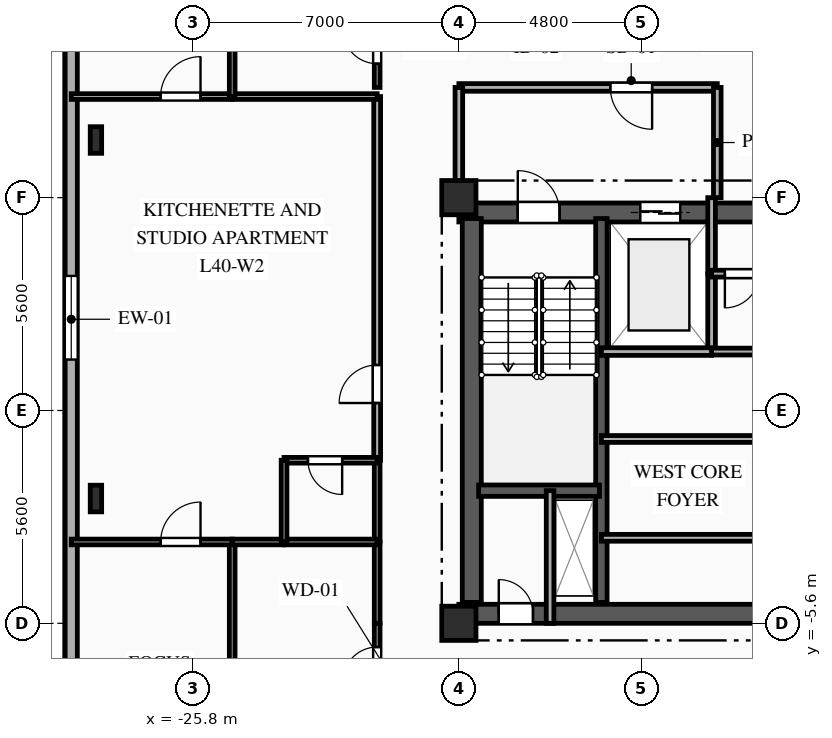
"""IFC4 building model, lengths in metres.
Left out: names, types, materials, properties, quantities, classifications, styles, units other than length and angle.
Written with IfcOpenShell. Run it as: python <this file> out.ifc"""

import sys

from ifc_helpers import new_model, si_unit, direction, frame, frame_2d, origin, origin_2d, place, context, subcontext, project, spatial, rectangle, i_section, extrude, element, fill, save


model = new_model("IFC4")
c1 = context("Model", 3, precision=1e-05, world=origin(), true_north=direction((0.0, 1.0)))
c2 = subcontext(c1, "Body", "Model", "MODEL_VIEW")
j1 = project(units=[si_unit("LENGTHUNIT", "METRE"), si_unit("PLANEANGLEUNIT", "RADIAN")], contexts=[c1])
p1 = place(None, origin())
s1 = spatial("IfcSite", under=j1, at=p1, CompositionType="ELEMENT")
p2 = place(p1, origin())
s2 = spatial("IfcBuilding", under=s1, at=p2, CompositionType="ELEMENT")
p3 = place(p2, frame((0.0, 0.0, 144.4)))
s3 = spatial("IfcBuildingStorey", under=s2, at=p3, CompositionType="ELEMENT", Elevation=144.4)
for number, where, z_axis, x_axis in (
    (1, (-18.8, -5.6, 0.0), (0.0, 0.0, 1.0), (1.0, 0.0, 0.0)),
    (2, (-18.8, 5.6, 0.0), (0.0, 0.0, 1.0), (1.0, 0.0, 0.0)),
):
    element("IfcColumn", number, at=place(p3, frame(where, z_axis=z_axis, x_axis=x_axis)), inside=s3, PredefinedType="COLUMN", context=c2, shape_type="SweptSolid", body=[
        extrude(rectangle(XDim=0.9, YDim=0.9, at=origin_2d()), origin(), (0.0, 0.0, 1.0), 3.35),
    ])
for number, where, z_axis, x_axis in (
    (3, (-28.35, 7.117, 0.0), (0.0, 0.0, 1.0), (1.0, 0.0, 0.0)),
    (4, (-28.35, -2.317, 0.0), (0.0, 0.0, 1.0), (1.0, 0.0, 0.0)),
):
    element("IfcColumn", number, at=place(p3, frame(where, z_axis=z_axis, x_axis=x_axis)), inside=s3, PredefinedType="COLUMN", context=c2, shape_type="SweptSolid", body=[
        extrude(i_section(OverallWidth=0.3, OverallDepth=0.7, WebThickness=0.017, FlangeThickness=0.032, FilletRadius=0.027, at=origin_2d()), origin(), (0.0, 0.0, 1.0), 3.35),
    ])
p4 = place(p3, frame((-29.0, -12.4, 0.0), z_axis=(0.0, 0.0, 1.0), x_axis=(0.0, 1.0, 0.0)))
e5 = element("IfcWall", 5, at=p4, inside=s3, PredefinedType="SOLIDWALL", context=c2, shape_type="SweptSolid", body=[
    extrude(rectangle(XDim=29.6, YDim=0.32, at=frame_2d((14.8, 0.0))), origin(), (0.0, 0.0, 1.0), 3.04),
])
p5 = place(p4, frame((3.895, 0.0, 0.85)))
e6 = element("IfcOpeningElement", 6, at=p5, cuts=e5, PredefinedType="OPENING", context=c2, shape_type="SweptSolid", body=[
    extrude(rectangle(XDim=1.65, YDim=1.85, at=frame_2d((0.825, 0.925))), frame((0.0, 0.17, 0.0), z_axis=(0.0, -1.0, 0.0), x_axis=(1.0, 0.0, 0.0)), (0.0, 0.0, 1.0), 0.34),
])
p6 = place(p4, frame((13.74, 0.0, 0.85)))
e7 = element("IfcOpeningElement", 7, at=p6, cuts=e5, PredefinedType="OPENING", context=c2, shape_type="SweptSolid", body=[
    extrude(rectangle(XDim=2.2, YDim=1.85, at=frame_2d((1.1, 0.925))), frame((0.0, 0.17, 0.0), z_axis=(0.0, -1.0, 0.0), x_axis=(1.0, 0.0, 0.0)), (0.0, 0.0, 1.0), 0.34),
])
p7 = place(p4, frame((24.135, 0.0, 0.85)))
e8 = element("IfcOpeningElement", 8, at=p7, cuts=e5, PredefinedType="OPENING", context=c2, shape_type="SweptSolid", body=[
    extrude(rectangle(XDim=1.65, YDim=1.85, at=frame_2d((0.825, 0.925))), frame((0.0, 0.17, 0.0), z_axis=(0.0, -1.0, 0.0), x_axis=(1.0, 0.0, 0.0)), (0.0, 0.0, 1.0), 0.34),
])
p8 = place(p3, frame((-18.8, 5.21, 0.0), z_axis=(0.0, 0.0, 1.0), x_axis=(1.0, 0.0, 0.0)))
e9 = element("IfcWall", 9, at=p8, inside=s3, PredefinedType="SHEAR", context=c2, shape_type="SweptSolid", body=[
    extrude(rectangle(XDim=9.6, YDim=0.5, at=frame_2d((4.8, 0.0))), origin(), (0.0, 0.0, 1.0), 3.04),
])
p9 = place(p8, frame((1.55, 0.0, 0.0)))
e10 = element("IfcOpeningElement", 10, at=p9, cuts=e9, PredefinedType="OPENING", context=c2, shape_type="SweptSolid", body=[
    extrude(rectangle(XDim=1.1, YDim=2.15, at=frame_2d((0.55, 1.075))), frame((0.0, 0.26, 0.0), z_axis=(0.0, -1.0, 0.0), x_axis=(1.0, 0.0, 0.0)), (0.0, 0.0, 1.0), 0.52),
])
p10 = place(p8, frame((4.775, 0.0, 0.0)))
e11 = element("IfcOpeningElement", 11, at=p10, cuts=e9, PredefinedType="OPENING", context=c2, shape_type="SweptSolid", body=[
    extrude(rectangle(XDim=1.05, YDim=2.1, at=frame_2d((0.525, 1.05))), frame((0.0, 0.26, 0.0), z_axis=(0.0, -1.0, 0.0), x_axis=(1.0, 0.0, 0.0)), (0.0, 0.0, 1.0), 0.52),
])
p11 = place(p3, frame((-18.8, -5.35, 0.0), z_axis=(0.0, 0.0, 1.0), x_axis=(1.0, 0.0, 0.0)))
e12 = element("IfcWall", 12, at=p11, inside=s3, PredefinedType="SHEAR", context=c2, shape_type="SweptSolid", body=[
    extrude(rectangle(XDim=9.6, YDim=0.5, at=frame_2d((4.8, 0.0))), origin(), (0.0, 0.0, 1.0), 3.04),
])
p12 = place(p11, frame((1.05, 0.0, 0.0)))
e13 = element("IfcOpeningElement", 13, at=p12, cuts=e12, PredefinedType="OPENING", context=c2, shape_type="SweptSolid", body=[
    extrude(rectangle(XDim=0.9, YDim=2.1, at=frame_2d((0.45, 1.05))), frame((0.0, 0.26, 0.0), z_axis=(0.0, -1.0, 0.0), x_axis=(1.0, 0.0, 0.0)), (0.0, 0.0, 1.0), 0.52),
])
p13 = place(p3, frame((-18.46, -5.05, 0.0), z_axis=(0.0, 0.0, 1.0), x_axis=(0.0, 1.0, 0.0)))
e14 = element("IfcWall", 14, at=p13, inside=s3, PredefinedType="SHEAR", context=c2, shape_type="SweptSolid", body=[
    extrude(rectangle(XDim=10.1, YDim=0.5, at=frame_2d((5.05, 0.0))), origin(), (0.0, 0.0, 1.0), 3.04),
])
p14 = place(p3, frame((-15.05, -5.05, 0.0), z_axis=(0.0, 0.0, 1.0), x_axis=(0.0, 1.0, 0.0)))
e15 = element("IfcWall", 15, at=p14, inside=s3, PredefinedType="SHEAR", context=c2, shape_type="SweptSolid", body=[
    extrude(rectangle(XDim=10.1, YDim=0.3, at=frame_2d((5.05, 0.0))), origin(), (0.0, 0.0, 1.0), 3.04),
])
p15 = place(p3, frame((-18.28, -2.11, 0.0), z_axis=(0.0, 0.0, 1.0), x_axis=(1.0, 0.0, 0.0)))
e16 = element("IfcWall", 16, at=p15, inside=s3, PredefinedType="SHEAR", context=c2, shape_type="SweptSolid", body=[
    extrude(rectangle(XDim=3.18, YDim=0.3, at=frame_2d((1.59, 0.0))), origin(), (0.0, 0.0, 1.0), 3.04),
])
p16 = place(p3, frame((-16.4, -5.6, 0.0), z_axis=(0.0, 0.0, 1.0), x_axis=(0.0, 1.0, 0.0)))
e17 = element("IfcWall", 17, at=p16, inside=s3, PredefinedType="PARTITIONING", context=c2, shape_type="SweptSolid", body=[
    extrude(rectangle(XDim=3.49, YDim=0.2, at=frame_2d((1.745, 0.0))), origin(), (0.0, 0.0, 1.0), 3.04),
])
p17 = place(p3, frame((-12.15, 1.55, 0.0), z_axis=(0.0, 0.0, 1.0), x_axis=(0.0, 1.0, 0.0)))
e18 = element("IfcWall", 18, at=p17, inside=s3, PredefinedType="PARTITIONING", context=c2, shape_type="SweptSolid", body=[
    extrude(rectangle(XDim=2.05, YDim=0.2, at=frame_2d((1.025, 0.0))), origin(), (0.0, 0.0, 1.0), 3.04),
])
p18 = place(p3, frame((-12.15, 3.6, 0.0), z_axis=(0.0, 0.0, 1.0), x_axis=(0.0, 1.0, 0.0)))
e19 = element("IfcWall", 19, at=p18, inside=s3, PredefinedType="PARTITIONING", context=c2, shape_type="SweptSolid", body=[
    extrude(rectangle(XDim=2.0, YDim=0.2, at=frame_2d((1.0, 0.0))), origin(), (0.0, 0.0, 1.0), 3.04),
])
p19 = place(p3, frame((-12.0, 8.5, 0.0), z_axis=(0.0, 0.0, 1.0), x_axis=(-1.0, 0.0, 0.0)))
e20 = element("IfcWall", 20, at=p19, inside=s3, PredefinedType="PARTITIONING", context=c2, shape_type="SweptSolid", body=[
    extrude(rectangle(XDim=6.8, YDim=0.2, at=frame_2d((3.4, 0.0))), origin(), (0.0, 0.0, 1.0), 3.04),
])
p20 = place(p19, frame((1.715, 0.0, 0.0)))
e21 = element("IfcOpeningElement", 21, at=p20, cuts=e20, PredefinedType="OPENING", context=c2, shape_type="SweptSolid", body=[
    extrude(rectangle(XDim=1.1, YDim=2.15, at=frame_2d((0.55, 1.075))), frame((0.0, 0.11, 0.0), z_axis=(0.0, -1.0, 0.0), x_axis=(1.0, 0.0, 0.0)), (0.0, 0.0, 1.0), 0.22),
])
p21 = place(p3, frame((-18.8, 8.5, 0.0), z_axis=(0.0, 0.0, 1.0), x_axis=(0.0, -1.0, 0.0)))
e22 = element("IfcWall", 22, at=p21, inside=s3, PredefinedType="PARTITIONING", context=c2, shape_type="SweptSolid", body=[
    extrude(rectangle(XDim=2.9, YDim=0.2, at=frame_2d((1.45, 0.0))), origin(), (0.0, 0.0, 1.0), 2.525),
])
p22 = place(p3, frame((-12.0, 5.6, 0.0), z_axis=(0.0, 0.0, 1.0), x_axis=(0.0, 1.0, 0.0)))
e23 = element("IfcWall", 23, at=p22, inside=s3, PredefinedType="PARTITIONING", context=c2, shape_type="SweptSolid", body=[
    extrude(rectangle(XDim=2.9, YDim=0.2, at=frame_2d((1.45, 0.0))), origin(), (0.0, 0.0, 1.0), 3.04),
])
p23 = place(p3, frame((-9.2, 3.6, 0.0), z_axis=(0.0, 0.0, 1.0), x_axis=(-1.0, 0.0, 0.0)))
e24 = element("IfcWall", 24, at=p23, inside=s3, PredefinedType="PARTITIONING", context=c2, shape_type="SweptSolid", body=[
    extrude(rectangle(XDim=2.95, YDim=0.18, at=frame_2d((1.475, 0.0))), origin(), (0.0, 0.0, 1.0), 3.04),
])
p24 = place(p23, frame((1.7, 0.0, 0.0)))
e25 = element("IfcOpeningElement", 25, at=p24, cuts=e24, PredefinedType="OPENING", context=c2, shape_type="SweptSolid", body=[
    extrude(rectangle(XDim=0.9, YDim=2.1, at=frame_2d((0.45, 1.05))), frame((0.0, 0.1, 0.0), z_axis=(0.0, -1.0, 0.0), x_axis=(1.0, 0.0, 0.0)), (0.0, 0.0, 1.0), 0.2),
])
p25 = place(p3, frame((-12.15, 1.55, 0.0), z_axis=(0.0, 0.0, 1.0), x_axis=(1.0, 0.0, 0.0)))
e26 = element("IfcWall", 26, at=p25, inside=s3, PredefinedType="PARTITIONING", context=c2, shape_type="SweptSolid", body=[
    extrude(rectangle(XDim=2.95, YDim=0.18, at=frame_2d((1.475, 0.0))), origin(), (0.0, 0.0, 1.0), 3.04),
])
p26 = place(p3, frame((-15.05, -3.35, 0.0), z_axis=(0.0, 0.0, 1.0), x_axis=(1.0, 0.0, 0.0)))
e27 = element("IfcWall", 27, at=p26, inside=s3, PredefinedType="PARTITIONING", context=c2, shape_type="SweptSolid", body=[
    extrude(rectangle(XDim=5.85, YDim=0.18, at=frame_2d((2.925, 0.0))), origin(), (0.0, 0.0, 1.0), 2.755),
])
p27 = place(p3, frame((-9.2, -0.75, 0.0), z_axis=(0.0, 0.0, 1.0), x_axis=(-1.0, 0.0, 0.0)))
e28 = element("IfcWall", 28, at=p27, inside=s3, PredefinedType="PARTITIONING", context=c2, shape_type="SweptSolid", body=[
    extrude(rectangle(XDim=5.85, YDim=0.18, at=frame_2d((2.925, 0.0))), origin(), (0.0, 0.0, 1.0), 3.04),
])
p28 = place(p3, frame((-20.95, 8.5, 0.0), z_axis=(0.0, 0.0, 1.0), x_axis=(0.0, 1.0, 0.0)))
e29 = element("IfcWall", 29, at=p28, inside=s3, PredefinedType="PARTITIONING", context=c2, shape_type="SweptSolid", body=[
    extrude(rectangle(XDim=2.15, YDim=0.15, at=frame_2d((1.075, 0.0))), origin(), (0.0, 0.0, 1.0), 3.04),
])
p29 = place(p28, frame((0.625, 0.0, 0.0)))
e30 = element("IfcOpeningElement", 30, at=p29, cuts=e29, PredefinedType="OPENING", context=c2, shape_type="SweptSolid", body=[
    extrude(rectangle(XDim=0.9, YDim=2.1, at=frame_2d((0.45, 1.05))), frame((0.0, 0.085, 0.0), z_axis=(0.0, -1.0, 0.0), x_axis=(1.0, 0.0, 0.0)), (0.0, 0.0, 1.0), 0.17),
])
p30 = place(p3, frame((-20.95, -7.75, 0.0), z_axis=(0.0, 0.0, 1.0), x_axis=(0.0, 1.0, 0.0)))
e31 = element("IfcWall", 31, at=p30, inside=s3, PredefinedType="PARTITIONING", context=c2, shape_type="SweptSolid", body=[
    extrude(rectangle(XDim=2.15, YDim=0.15, at=frame_2d((1.075, 0.0))), origin(), (0.0, 0.0, 1.0), 3.04),
])
p31 = place(p30, frame((0.625, 0.0, 0.0)))
e32 = element("IfcOpeningElement", 32, at=p31, cuts=e31, PredefinedType="OPENING", context=c2, shape_type="SweptSolid", body=[
    extrude(rectangle(XDim=0.9, YDim=2.1, at=frame_2d((0.45, 1.05))), frame((0.0, 0.085, 0.0), z_axis=(0.0, -1.0, 0.0), x_axis=(1.0, 0.0, 0.0)), (0.0, 0.0, 1.0), 0.17),
])
p32 = place(p3, frame((-20.95, -5.6, 0.0), z_axis=(0.0, 0.0, 1.0), x_axis=(0.0, 1.0, 0.0)))
e33 = element("IfcWall", 33, at=p32, inside=s3, PredefinedType="PARTITIONING", context=c2, shape_type="SweptSolid", body=[
    extrude(rectangle(XDim=2.14, YDim=0.15, at=frame_2d((1.07, 0.0))), origin(), (0.0, 0.0, 1.0), 3.04),
])
p33 = place(p3, frame((-20.95, -1.31, 0.0), z_axis=(0.0, 0.0, 1.0), x_axis=(0.0, 1.0, 0.0)))
e34 = element("IfcWall", 34, at=p33, inside=s3, PredefinedType="PARTITIONING", context=c2, shape_type="SweptSolid", body=[
    extrude(rectangle(XDim=9.57, YDim=0.18, at=frame_2d((4.785, 0.0))), origin(), (0.0, 0.0, 1.0), 3.04),
])
p34 = place(p33, frame((1.506, 0.0, 0.0)))
e35 = element("IfcOpeningElement", 35, at=p34, cuts=e34, PredefinedType="OPENING", context=c2, shape_type="SweptSolid", body=[
    extrude(rectangle(XDim=1.0, YDim=2.15, at=frame_2d((0.5, 1.075))), frame((0.0, 0.1, 0.0), z_axis=(0.0, -1.0, 0.0), x_axis=(1.0, 0.0, 0.0)), (0.0, 0.0, 1.0), 0.2),
])
p35 = place(p3, frame((-20.95, -3.46, 0.0), z_axis=(0.0, 0.0, 1.0), x_axis=(0.0, 1.0, 0.0)))
e36 = element("IfcWall", 36, at=p35, inside=s3, PredefinedType="PLUMBINGWALL", context=c2, shape_type="SweptSolid", body=[
    extrude(rectangle(XDim=2.15, YDim=0.15, at=frame_2d((1.075, 0.0))), origin(), (0.0, 0.0, 1.0), 3.04),
])
p36 = place(p3, frame((-24.765, -3.46, 0.0), z_axis=(0.0, 0.0, 1.0), x_axis=(0.0, -1.0, 0.0)))
e37 = element("IfcWall", 37, at=p36, inside=s3, PredefinedType="PARTITIONING", context=c2, shape_type="SweptSolid", body=[
    extrude(rectangle(XDim=12.14, YDim=0.15, at=frame_2d((6.07, 0.0))), origin(), (0.0, 0.0, 1.0), 3.04),
])
p37 = place(p3, frame((-29.0, -3.46, 0.0), z_axis=(0.0, 0.0, 1.0), x_axis=(1.0, 0.0, 0.0)))
e38 = element("IfcWall", 38, at=p37, inside=s3, PredefinedType="PARTITIONING", context=c2, shape_type="SweptSolid", body=[
    extrude(rectangle(XDim=4.235, YDim=0.15, at=frame_2d((2.118, 0.0))), origin(), (0.0, 0.0, 1.0), 3.04),
])
p38 = place(p37, frame((2.352, 0.0, 0.0)))
e39 = element("IfcOpeningElement", 39, at=p38, cuts=e38, PredefinedType="OPENING", context=c2, shape_type="SweptSolid", body=[
    extrude(rectangle(XDim=1.05, YDim=2.15, at=frame_2d((0.525, 1.075))), frame((0.0, 0.085, 0.0), z_axis=(0.0, -1.0, 0.0), x_axis=(1.0, 0.0, 0.0)), (0.0, 0.0, 1.0), 0.17),
])
p39 = place(p3, frame((-24.765, -3.46, 0.0), z_axis=(0.0, 0.0, 1.0), x_axis=(1.0, 0.0, 0.0)))
e40 = element("IfcWall", 40, at=p39, inside=s3, PredefinedType="PARTITIONING", context=c2, shape_type="SweptSolid", body=[
    extrude(rectangle(XDim=1.365, YDim=0.15, at=frame_2d((0.683, 0.0))), origin(), (0.0, 0.0, 1.0), 3.04),
])
p40 = place(p3, frame((-23.4, -3.46, 0.0), z_axis=(0.0, 0.0, 1.0), x_axis=(1.0, 0.0, 0.0)))
e41 = element("IfcWall", 41, at=p40, inside=s3, PredefinedType="PLUMBINGWALL", context=c2, shape_type="SweptSolid", body=[
    extrude(rectangle(XDim=2.45, YDim=0.15, at=frame_2d((1.225, 0.0))), origin(), (0.0, 0.0, 1.0), 3.04),
])
p41 = place(p3, frame((-20.95, -1.31, 0.0), z_axis=(0.0, 0.0, 1.0), x_axis=(-1.0, 0.0, 0.0)))
e42 = element("IfcWall", 42, at=p41, inside=s3, PredefinedType="PLUMBINGWALL", context=c2, shape_type="SweptSolid", body=[
    extrude(rectangle(XDim=2.45, YDim=0.15, at=frame_2d((1.225, 0.0))), origin(), (0.0, 0.0, 1.0), 3.04),
])
p42 = place(p41, frame((0.921, 0.0, 0.0)))
e43 = element("IfcOpeningElement", 43, at=p42, cuts=e42, PredefinedType="OPENING", context=c2, shape_type="SweptSolid", body=[
    extrude(rectangle(XDim=0.9, YDim=2.1, at=frame_2d((0.45, 1.05))), frame((0.0, 0.085, 0.0), z_axis=(0.0, -1.0, 0.0), x_axis=(1.0, 0.0, 0.0)), (0.0, 0.0, 1.0), 0.17),
])
p43 = place(p3, frame((-23.4, -1.31, 0.0), z_axis=(0.0, 0.0, 1.0), x_axis=(0.0, -1.0, 0.0)))
e44 = element("IfcWall", 44, at=p43, inside=s3, PredefinedType="PLUMBINGWALL", context=c2, shape_type="SweptSolid", body=[
    extrude(rectangle(XDim=2.15, YDim=0.15, at=frame_2d((1.075, 0.0))), origin(), (0.0, 0.0, 1.0), 3.04),
])
p44 = place(p3, frame((-29.0, 8.26, 0.0), z_axis=(0.0, 0.0, 1.0), x_axis=(1.0, 0.0, 0.0)))
e45 = element("IfcWall", 45, at=p44, inside=s3, PredefinedType="PARTITIONING", context=c2, shape_type="SweptSolid", body=[
    extrude(rectangle(XDim=4.235, YDim=0.15, at=frame_2d((2.118, 0.0))), origin(), (0.0, 0.0, 1.0), 3.04),
])
p45 = place(p44, frame((2.352, 0.0, 0.0)))
e46 = element("IfcOpeningElement", 46, at=p45, cuts=e45, PredefinedType="OPENING", context=c2, shape_type="SweptSolid", body=[
    extrude(rectangle(XDim=1.05, YDim=2.15, at=frame_2d((0.525, 1.075))), frame((0.0, 0.085, 0.0), z_axis=(0.0, -1.0, 0.0), x_axis=(1.0, 0.0, 0.0)), (0.0, 0.0, 1.0), 0.17),
])
p46 = place(p3, frame((-24.765, 8.26, 0.0), z_axis=(0.0, 0.0, 1.0), x_axis=(1.0, 0.0, 0.0)))
e47 = element("IfcWall", 47, at=p46, inside=s3, PredefinedType="PARTITIONING", context=c2, shape_type="SweptSolid", body=[
    extrude(rectangle(XDim=3.815, YDim=0.15, at=frame_2d((1.907, 0.0))), origin(), (0.0, 0.0, 1.0), 3.04),
])
p47 = place(p3, frame((-24.765, 20.4, 0.0), z_axis=(0.0, 0.0, 1.0), x_axis=(0.0, -1.0, 0.0)))
e48 = element("IfcWall", 48, at=p47, inside=s3, PredefinedType="PARTITIONING", context=c2, shape_type="SweptSolid", body=[
    extrude(rectangle(XDim=12.14, YDim=0.15, at=frame_2d((6.07, 0.0))), origin(), (0.0, 0.0, 1.0), 3.04),
])
p48 = place(p3, frame((-15.05, 1.55, 0.0), z_axis=(0.0, 0.0, 1.0), x_axis=(1.0, 0.0, 0.0)))
e49 = element("IfcWall", 49, at=p48, inside=s3, PredefinedType="PARTITIONING", context=c2, shape_type="SweptSolid", body=[
    extrude(rectangle(XDim=2.9, YDim=0.2, at=frame_2d((1.45, 0.0))), origin(), (0.0, 0.0, 1.0), 3.04),
])
p49 = place(p6, origin())
e50 = element("IfcWindow", 50, at=p49, inside=s3, PartitioningType="SINGLE_PANEL", PredefinedType="WINDOW", context=c2, shape_type="SweptSolid", body=[
    extrude(rectangle(XDim=2.2, YDim=1.85, at=frame_2d((1.1, 0.925))), frame((0.0, 0.03, 0.0), z_axis=(0.0, -1.0, 0.0), x_axis=(1.0, 0.0, 0.0)), (0.0, 0.0, 1.0), 0.06),
])
fill(e7, e50)
p50 = place(p9, origin())
e51 = element("IfcDoor", 51, at=p50, inside=s3, OperationType="SINGLE_SWING_LEFT", PredefinedType="DOOR", context=c2, shape_type="SweptSolid", body=[
    extrude(rectangle(XDim=1.1, YDim=2.15, at=frame_2d((0.55, 1.075))), frame((0.0, 0.025, 0.0), z_axis=(0.0, -1.0, 0.0), x_axis=(1.0, 0.0, 0.0)), (0.0, 0.0, 1.0), 0.05),
])
fill(e10, e51)
p51 = place(p10, origin())
e52 = element("IfcDoor", 52, at=p51, inside=s3, OperationType="DOUBLE_DOOR_SLIDING", PredefinedType="DOOR", context=c2, shape_type="SweptSolid", body=[
    extrude(rectangle(XDim=1.05, YDim=2.1, at=frame_2d((0.525, 1.05))), frame((0.0, 0.025, 0.0), z_axis=(0.0, -1.0, 0.0), x_axis=(1.0, 0.0, 0.0)), (0.0, 0.0, 1.0), 0.05),
])
fill(e11, e52)
p52 = place(p12, origin())
e53 = element("IfcDoor", 53, at=p52, inside=s3, OperationType="SINGLE_SWING_LEFT", PredefinedType="DOOR", context=c2, shape_type="SweptSolid", body=[
    extrude(rectangle(XDim=0.9, YDim=2.1, at=frame_2d((0.45, 1.05))), frame((0.0, 0.025, 0.0), z_axis=(0.0, -1.0, 0.0), x_axis=(1.0, 0.0, 0.0)), (0.0, 0.0, 1.0), 0.05),
])
fill(e13, e53)
p53 = place(p20, origin())
e54 = element("IfcDoor", 54, at=p53, inside=s3, OperationType="SINGLE_SWING_LEFT", PredefinedType="DOOR", context=c2, shape_type="SweptSolid", body=[
    extrude(rectangle(XDim=1.1, YDim=2.15, at=frame_2d((0.55, 1.075))), frame((0.0, 0.025, 0.0), z_axis=(0.0, -1.0, 0.0), x_axis=(1.0, 0.0, 0.0)), (0.0, 0.0, 1.0), 0.05),
])
fill(e21, e54)
p54 = place(p24, origin())
e55 = element("IfcDoor", 55, at=p54, inside=s3, OperationType="SINGLE_SWING_RIGHT", PredefinedType="DOOR", context=c2, shape_type="SweptSolid", body=[
    extrude(rectangle(XDim=0.9, YDim=2.1, at=frame_2d((0.45, 1.05))), frame((0.0, 0.025, 0.0), z_axis=(0.0, -1.0, 0.0), x_axis=(1.0, 0.0, 0.0)), (0.0, 0.0, 1.0), 0.05),
])
fill(e25, e55)
p55 = place(p29, origin())
e56 = element("IfcDoor", 56, at=p55, inside=s3, OperationType="SINGLE_SWING_RIGHT", PredefinedType="DOOR", context=c2, shape_type="SweptSolid", body=[
    extrude(rectangle(XDim=0.9, YDim=2.1, at=frame_2d((0.45, 1.05))), frame((0.0, 0.025, 0.0), z_axis=(0.0, -1.0, 0.0), x_axis=(1.0, 0.0, 0.0)), (0.0, 0.0, 1.0), 0.05),
])
fill(e30, e56)
p56 = place(p31, origin())
e57 = element("IfcDoor", 57, at=p56, inside=s3, OperationType="SINGLE_SWING_LEFT", PredefinedType="DOOR", context=c2, shape_type="SweptSolid", body=[
    extrude(rectangle(XDim=0.9, YDim=2.1, at=frame_2d((0.45, 1.05))), frame((0.0, 0.025, 0.0), z_axis=(0.0, -1.0, 0.0), x_axis=(1.0, 0.0, 0.0)), (0.0, 0.0, 1.0), 0.05),
])
fill(e32, e57)
p57 = place(p34, origin())
e58 = element("IfcDoor", 58, at=p57, inside=s3, OperationType="SINGLE_SWING_LEFT", PredefinedType="DOOR", context=c2, shape_type="SweptSolid", body=[
    extrude(rectangle(XDim=1.0, YDim=2.15, at=frame_2d((0.5, 1.075))), frame((0.0, 0.025, 0.0), z_axis=(0.0, -1.0, 0.0), x_axis=(1.0, 0.0, 0.0)), (0.0, 0.0, 1.0), 0.05),
])
fill(e35, e58)
p58 = place(p38, origin())
e59 = element("IfcDoor", 59, at=p58, inside=s3, OperationType="SINGLE_SWING_RIGHT", PredefinedType="DOOR", context=c2, shape_type="SweptSolid", body=[
    extrude(rectangle(XDim=1.05, YDim=2.15, at=frame_2d((0.525, 1.075))), frame((0.0, 0.025, 0.0), z_axis=(0.0, -1.0, 0.0), x_axis=(1.0, 0.0, 0.0)), (0.0, 0.0, 1.0), 0.05),
])
fill(e39, e59)
p59 = place(p42, origin())
e60 = element("IfcDoor", 60, at=p59, inside=s3, OperationType="SINGLE_SWING_LEFT", PredefinedType="DOOR", context=c2, shape_type="SweptSolid", body=[
    extrude(rectangle(XDim=0.9, YDim=2.1, at=frame_2d((0.45, 1.05))), frame((0.0, 0.025, 0.0), z_axis=(0.0, -1.0, 0.0), x_axis=(1.0, 0.0, 0.0)), (0.0, 0.0, 1.0), 0.05),
])
fill(e43, e60)
p60 = place(p45, origin())
e61 = element("IfcDoor", 61, at=p60, inside=s3, OperationType="SINGLE_SWING_RIGHT", PredefinedType="DOOR", context=c2, shape_type="SweptSolid", body=[
    extrude(rectangle(XDim=1.05, YDim=2.15, at=frame_2d((0.525, 1.075))), frame((0.0, 0.025, 0.0), z_axis=(0.0, -1.0, 0.0), x_axis=(1.0, 0.0, 0.0)), (0.0, 0.0, 1.0), 0.05),
])
fill(e46, e61)
save(model, sys.argv[1])
